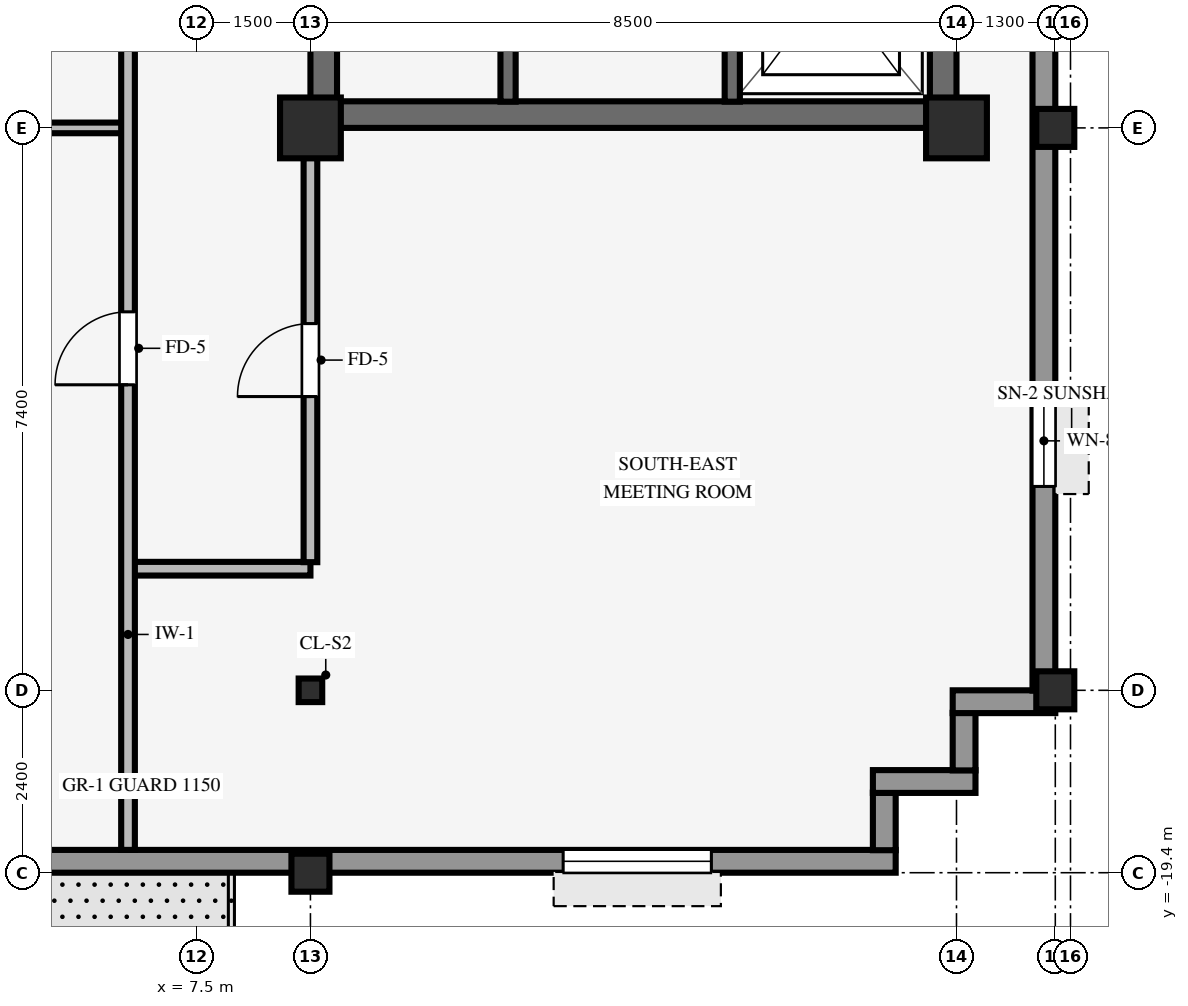
"""IFC4 building model, lengths in metres.
Left out: names, types, materials, properties, quantities, classifications, styles, units other than length and angle.
Written with IfcOpenShell. Run it as: python <this file> out.ifc"""

import sys

from ifc_helpers import new_model, si_unit, direction, frame, frame_2d, origin, origin_2d, place, context, subcontext, project, spatial, rectangle, hollow_rectangle, i_section, extrude, source, transform, mapped, element, fill, save


model = new_model("IFC4")
c1 = context("Model", 3, precision=1e-05, world=origin(), true_north=direction((0.0, 1.0)))
c2 = subcontext(c1, "Body", "Model", "MODEL_VIEW")
j1 = project(units=[si_unit("LENGTHUNIT", "METRE"), si_unit("PLANEANGLEUNIT", "RADIAN")], contexts=[c1])
p1 = place(None, origin())
s1 = spatial("IfcSite", under=j1, at=p1, CompositionType="ELEMENT")
p2 = place(p1, origin())
s2 = spatial("IfcBuilding", under=s1, at=p2, CompositionType="ELEMENT")
p3 = place(p2, frame((0.0, 0.0, 261.6)))
s3 = spatial("IfcBuildingStorey", under=s2, at=p3, CompositionType="ELEMENT", Elevation=261.6)
p4 = place(p3, frame((9.0, -9.425, 0.0), z_axis=(0.0, 0.0, 1.0), x_axis=(1.0, 0.0, 0.0)))
e1 = element("IfcWall", 1, at=p4, inside=s3, PredefinedType="SHEAR", context=c2, shape_type="SweptSolid", body=[
    extrude(rectangle(XDim=8.5, YDim=0.35, at=frame_2d((4.25, 0.0))), origin(), (0.0, 0.0, 1.0), 3.37),
])
p5 = place(p3, frame((9.175, -9.255, 0.0), z_axis=(0.0, 0.0, 1.0), x_axis=(0.0, 1.0, 0.0)))
e2 = element("IfcWall", 2, at=p5, inside=s3, PredefinedType="SHEAR", context=c2, shape_type="SweptSolid", body=[
    extrude(rectangle(XDim=18.51, YDim=0.35, at=frame_2d((9.255, 0.0))), origin(), (0.0, 0.0, 1.0), 3.37),
])
p6 = place(p5, frame((8.655, 0.0, 0.0)))
e3 = element("IfcOpeningElement", 3, at=p6, cuts=e2, PredefinedType="OPENING", context=c2, shape_type="SweptSolid", body=[
    extrude(rectangle(XDim=1.2, YDim=2.15, at=frame_2d((0.6, 1.075))), frame((0.0, 0.185, 0.0), z_axis=(0.0, -1.0, 0.0), x_axis=(1.0, 0.0, 0.0)), (0.0, 0.0, 1.0), 0.37),
])
p7 = place(p3, frame((17.325, -9.255, 0.0), z_axis=(0.0, 0.0, 1.0), x_axis=(0.0, 1.0, 0.0)))
e4 = element("IfcWall", 4, at=p7, inside=s3, PredefinedType="SHEAR", context=c2, shape_type="SweptSolid", body=[
    extrude(rectangle(XDim=18.51, YDim=0.35, at=frame_2d((9.255, 0.0))), origin(), (0.0, 0.0, 1.0), 3.37),
])
for number, where, z_axis, x_axis in (
    (5, (9.0, -9.6, 0.0), (0.0, 0.0, 1.0), (1.0, 0.0, 0.0)),
    (6, (17.5, -9.6, 0.0), (0.0, 0.0, 1.0), (1.0, 0.0, 0.0)),
):
    element("IfcColumn", number, at=place(p3, frame(where, z_axis=z_axis, x_axis=x_axis)), inside=s3, PredefinedType="COLUMN", context=c2, shape_type="SweptSolid", body=[
        extrude(rectangle(XDim=0.8, YDim=0.8, at=origin_2d()), origin(), (0.0, 0.0, 1.0), 3.37),
    ])
for number, where, z_axis, x_axis in (
    (7, (18.8, -17.0, 0.0), (0.0, 0.0, 1.0), (1.0, 0.0, 0.0)),
    (8, (18.8, -9.6, 0.0), (0.0, 0.0, 1.0), (1.0, 0.0, 0.0)),
    (9, (9.0, -19.4, 0.0), (0.0, 0.0, 1.0), (1.0, 0.0, 0.0)),
):
    element("IfcColumn", number, at=place(p3, frame(where, z_axis=z_axis, x_axis=x_axis)), inside=s3, PredefinedType="COLUMN", context=c2, shape_type="SweptSolid", body=[
        extrude(hollow_rectangle(XDim=0.5, YDim=0.5, WallThickness=0.032, InnerFilletRadius=0.032, OuterFilletRadius=0.064, at=origin_2d()), origin(), (0.0, 0.0, 1.0), 3.37),
    ])
p8 = place(p3, frame((9.0, -17.0, 0.0), z_axis=(0.0, 0.0, 1.0), x_axis=(1.0, 0.0, 0.0)))
e10 = element("IfcColumn", 10, at=p8, inside=s3, PredefinedType="COLUMN", context=c2, shape_type="SweptSolid", body=[
    extrude(i_section(OverallWidth=0.31, OverallDepth=0.31, WebThickness=0.015, FlangeThickness=0.015, FilletRadius=0.015, at=origin_2d()), origin(), (0.0, 0.0, 1.0), 3.37),
])
p9 = place(p3, frame((-18.9, -19.25, 0.0), z_axis=(0.0, 0.0, 1.0), x_axis=(1.0, 0.0, 0.0)))
e11 = element("IfcWall", 11, at=p9, inside=s3, PredefinedType="STANDARD", context=c2, shape_type="SweptSolid", body=[
    extrude(rectangle(XDim=35.6, YDim=0.3, at=frame_2d((17.8, 0.0))), origin(), (0.0, 0.0, 1.0), 2.705),
])
p10 = place(p9, frame((24.15, 0.0, 0.0), z_axis=(0.0, 0.0, 1.0), x_axis=(-1.0, 0.0, 0.0)))
e12 = element("IfcOpeningElement", 12, at=p10, cuts=e11, PredefinedType="OPENING", context=c2, shape_type="SweptSolid", body=[
    extrude(rectangle(XDim=1.05, YDim=2.1, at=frame_2d((0.525, 1.05))), frame((0.0, 0.16, 0.0), z_axis=(0.0, -1.0, 0.0), x_axis=(1.0, 0.0, 0.0)), (0.0, 0.0, 1.0), 0.32),
])
p11 = place(p9, frame((2.425, 0.0, 0.8)))
e13 = element("IfcOpeningElement", 13, at=p11, cuts=e11, PredefinedType="OPENING", context=c2, shape_type="SweptSolid", body=[
    extrude(rectangle(XDim=1.95, YDim=1.48, at=frame_2d((0.975, 0.74))), frame((0.0, 0.16, 0.0), z_axis=(0.0, -1.0, 0.0), x_axis=(1.0, 0.0, 0.0)), (0.0, 0.0, 1.0), 0.32),
])
p12 = place(p9, frame((7.225, 0.0, 0.8)))
e14 = element("IfcOpeningElement", 14, at=p12, cuts=e11, PredefinedType="OPENING", context=c2, shape_type="SweptSolid", body=[
    extrude(rectangle(XDim=1.95, YDim=1.48, at=frame_2d((0.975, 0.74))), frame((0.0, 0.16, 0.0), z_axis=(0.0, -1.0, 0.0), x_axis=(1.0, 0.0, 0.0)), (0.0, 0.0, 1.0), 0.32),
])
p13 = place(p9, frame((12.925, 0.0, 0.8)))
e15 = element("IfcOpeningElement", 15, at=p13, cuts=e11, PredefinedType="OPENING", context=c2, shape_type="SweptSolid", body=[
    extrude(rectangle(XDim=1.95, YDim=1.48, at=frame_2d((0.975, 0.74))), frame((0.0, 0.16, 0.0), z_axis=(0.0, -1.0, 0.0), x_axis=(1.0, 0.0, 0.0)), (0.0, 0.0, 1.0), 0.32),
])
p14 = place(p9, frame((15.475, 0.0, 0.8)))
e16 = element("IfcOpeningElement", 16, at=p14, cuts=e11, PredefinedType="OPENING", context=c2, shape_type="SweptSolid", body=[
    extrude(rectangle(XDim=1.95, YDim=1.48, at=frame_2d((0.975, 0.74))), frame((0.0, 0.16, 0.0), z_axis=(0.0, -1.0, 0.0), x_axis=(1.0, 0.0, 0.0)), (0.0, 0.0, 1.0), 0.32),
])
p15 = place(p9, frame((20.725, 0.0, 0.8)))
e17 = element("IfcOpeningElement", 17, at=p15, cuts=e11, PredefinedType="OPENING", context=c2, shape_type="SweptSolid", body=[
    extrude(rectangle(XDim=1.95, YDim=1.48, at=frame_2d((0.975, 0.74))), frame((0.0, 0.16, 0.0), z_axis=(0.0, -1.0, 0.0), x_axis=(1.0, 0.0, 0.0)), (0.0, 0.0, 1.0), 0.32),
])
p16 = place(p9, frame((31.225, 0.0, 0.8)))
e18 = element("IfcOpeningElement", 18, at=p16, cuts=e11, PredefinedType="OPENING", context=c2, shape_type="SweptSolid", body=[
    extrude(rectangle(XDim=1.95, YDim=1.48, at=frame_2d((0.975, 0.74))), frame((0.0, 0.16, 0.0), z_axis=(0.0, -1.0, 0.0), x_axis=(1.0, 0.0, 0.0)), (0.0, 0.0, 1.0), 0.32),
])
p17 = place(p3, frame((16.55, -19.104, 0.0), z_axis=(0.0, 0.0, 1.0), x_axis=(0.0, 1.0, 0.0)))
e19 = element("IfcWall", 19, at=p17, inside=s3, PredefinedType="STANDARD", context=c2, shape_type="SweptSolid", body=[
    extrude(rectangle(XDim=0.758, YDim=0.3, at=frame_2d((0.379, 0.0))), origin(), (0.0, 0.0, 1.0), 2.892),
])
p18 = place(p3, frame((16.4, -18.2, 0.0), z_axis=(0.0, 0.0, 1.0), x_axis=(1.0, 0.0, 0.0)))
e20 = element("IfcWall", 20, at=p18, inside=s3, PredefinedType="STANDARD", context=c2, shape_type="SweptSolid", body=[
    extrude(rectangle(XDim=1.35, YDim=0.3, at=frame_2d((0.675, 0.0))), origin(), (0.0, 0.0, 1.0), 2.892),
])
p19 = place(p3, frame((17.6, -18.054, 0.0), z_axis=(0.0, 0.0, 1.0), x_axis=(0.0, 1.0, 0.0)))
e21 = element("IfcWall", 21, at=p19, inside=s3, PredefinedType="STANDARD", context=c2, shape_type="SweptSolid", body=[
    extrude(rectangle(XDim=0.758, YDim=0.3, at=frame_2d((0.379, 0.0))), origin(), (0.0, 0.0, 1.0), 2.892),
])
p20 = place(p3, frame((17.45, -17.15, 0.0), z_axis=(0.0, 0.0, 1.0), x_axis=(1.0, 0.0, 0.0)))
e22 = element("IfcWall", 22, at=p20, inside=s3, PredefinedType="STANDARD", context=c2, shape_type="SweptSolid", body=[
    extrude(rectangle(XDim=1.35, YDim=0.3, at=frame_2d((0.675, 0.0))), origin(), (0.0, 0.0, 1.0), 2.892),
])
p21 = place(p3, frame((18.65, -17.004, 0.0), z_axis=(0.0, 0.0, 1.0), x_axis=(0.0, 1.0, 0.0)))
e23 = element("IfcWall", 23, at=p21, inside=s3, PredefinedType="STANDARD", context=c2, shape_type="SweptSolid", body=[
    extrude(rectangle(XDim=34.008, YDim=0.3, at=frame_2d((17.004, 0.0))), origin(), (0.0, 0.0, 1.0), 2.705),
])
p22 = place(p21, frame((2.686, 0.0, 0.8)))
e24 = element("IfcOpeningElement", 24, at=p22, cuts=e23, PredefinedType="OPENING", context=c2, shape_type="SweptSolid", body=[
    extrude(rectangle(XDim=1.2, YDim=1.48, at=frame_2d((0.6, 0.74))), frame((0.0, 0.16, 0.0), z_axis=(0.0, -1.0, 0.0), x_axis=(1.0, 0.0, 0.0)), (0.0, 0.0, 1.0), 0.32),
])
p23 = place(p21, frame((30.122, 0.0, 0.8)))
e25 = element("IfcOpeningElement", 25, at=p23, cuts=e23, PredefinedType="OPENING", context=c2, shape_type="SweptSolid", body=[
    extrude(rectangle(XDim=1.2, YDim=1.48, at=frame_2d((0.6, 0.74))), frame((0.0, 0.16, 0.0), z_axis=(0.0, -1.0, 0.0), x_axis=(1.0, 0.0, 0.0)), (0.0, 0.0, 1.0), 0.32),
])
p24 = place(p3, frame((14.55, -9.255, 0.0), z_axis=(0.0, 0.0, 1.0), x_axis=(0.0, 1.0, 0.0)))
e26 = element("IfcWall", 26, at=p24, inside=s3, PredefinedType="SHEAR", context=c2, shape_type="SweptSolid", body=[
    extrude(rectangle(XDim=10.16, YDim=0.2, at=frame_2d((5.08, 0.0))), origin(), (0.0, 0.0, 1.0), 3.37),
])
p25 = place(p24, frame((6.615, 0.0, 0.0)))
e27 = element("IfcOpeningElement", 27, at=p25, cuts=e26, PredefinedType="OPENING", context=c2, shape_type="SweptSolid", body=[
    extrude(rectangle(XDim=0.88, YDim=2.1, at=frame_2d((0.44, 1.05))), frame((0.0, 0.11, 0.0), z_axis=(0.0, -1.0, 0.0), x_axis=(1.0, 0.0, 0.0)), (0.0, 0.0, 1.0), 0.22),
])
p26 = place(p24, frame((0.98, 0.0, 0.0)))
e28 = element("IfcOpeningElement", 28, at=p26, cuts=e26, PredefinedType="OPENING", context=c2, shape_type="SweptSolid", body=[
    extrude(rectangle(XDim=1.15, YDim=2.15, at=frame_2d((0.575, 1.075))), frame((0.0, 0.11, 0.0), z_axis=(0.0, -1.0, 0.0), x_axis=(1.0, 0.0, 0.0)), (0.0, 0.0, 1.0), 0.22),
])
p27 = place(p3, frame((11.6, -9.255, 0.0), z_axis=(0.0, 0.0, 1.0), x_axis=(0.0, 1.0, 0.0)))
e29 = element("IfcWall", 29, at=p27, inside=s3, PredefinedType="SHEAR", context=c2, shape_type="SweptSolid", body=[
    extrude(rectangle(XDim=8.025, YDim=0.2, at=frame_2d((4.012, 0.0))), origin(), (0.0, 0.0, 1.0), 3.37),
])
p28 = place(p27, frame((5.615, 0.0, 0.0)))
e30 = element("IfcOpeningElement", 30, at=p28, cuts=e29, PredefinedType="OPENING", context=c2, shape_type="SweptSolid", body=[
    extrude(rectangle(XDim=0.88, YDim=2.1, at=frame_2d((0.44, 1.05))), frame((0.0, 0.11, 0.0), z_axis=(0.0, -1.0, 0.0), x_axis=(1.0, 0.0, 0.0)), (0.0, 0.0, 1.0), 0.22),
])
p29 = place(p3, frame((6.666, -15.4, 0.0), z_axis=(0.0, 0.0, 1.0), x_axis=(1.0, 0.0, 0.0)))
e31 = element("IfcWall", 31, at=p29, inside=s3, PredefinedType="PARTITIONING", context=c2, shape_type="SweptSolid", body=[
    extrude(rectangle(XDim=2.334, YDim=0.18, at=frame_2d((1.167, 0.0))), origin(), (0.0, 0.0, 1.0), 3.36),
])
p30 = place(p3, frame((0.151, -9.6, 0.0), z_axis=(0.0, 0.0, 1.0), x_axis=(1.0, 0.0, 0.0)))
e32 = element("IfcWall", 32, at=p30, inside=s3, PredefinedType="PARTITIONING", context=c2, shape_type="SweptSolid", body=[
    extrude(rectangle(XDim=6.383, YDim=0.14, at=frame_2d((3.191, 0.0))), origin(), (0.0, 0.0, 1.0), 2.405),
])
p31 = place(p3, frame((6.6, -19.1, 0.0), z_axis=(0.0, 0.0, 1.0), x_axis=(0.0, 1.0, 0.0)))
e33 = element("IfcWall", 33, at=p31, inside=s3, PredefinedType="PARTITIONING", context=c2, shape_type="SweptSolid", body=[
    extrude(rectangle(XDim=17.764, YDim=0.18, at=frame_2d((8.882, 0.0))), origin(), (0.0, 0.0, 1.0), 3.36),
])
p32 = place(p31, frame((13.152, 0.0, 0.0)))
e34 = element("IfcOpeningElement", 34, at=p32, cuts=e33, PredefinedType="OPENING", context=c2, shape_type="SweptSolid", body=[
    extrude(rectangle(XDim=0.96, YDim=2.1, at=frame_2d((0.48, 1.05))), frame((0.0, 0.1, 0.0), z_axis=(0.0, -1.0, 0.0), x_axis=(1.0, 0.0, 0.0)), (0.0, 0.0, 1.0), 0.2),
])
p33 = place(p31, frame((6.12, 0.0, 0.0)))
e35 = element("IfcOpeningElement", 35, at=p33, cuts=e33, PredefinedType="OPENING", context=c2, shape_type="SweptSolid", body=[
    extrude(rectangle(XDim=0.96, YDim=2.1, at=frame_2d((0.48, 1.05))), frame((0.0, 0.1, 0.0), z_axis=(0.0, -1.0, 0.0), x_axis=(1.0, 0.0, 0.0)), (0.0, 0.0, 1.0), 0.2),
])
p34 = place(p3, frame((9.0, -15.314, 0.0), z_axis=(0.0, 0.0, 1.0), x_axis=(0.0, 1.0, 0.0)))
e36 = element("IfcWall", 36, at=p34, inside=s3, PredefinedType="PARTITIONING", context=c2, shape_type="SweptSolid", body=[
    extrude(rectangle(XDim=5.318, YDim=0.18, at=frame_2d((2.659, 0.0))), origin(), (0.0, 0.0, 1.0), 2.892),
])
p35 = place(p34, frame((2.179, 0.0, 0.0)))
e37 = element("IfcOpeningElement", 37, at=p35, cuts=e36, PredefinedType="OPENING", context=c2, shape_type="SweptSolid", body=[
    extrude(rectangle(XDim=0.96, YDim=2.1, at=frame_2d((0.48, 1.05))), frame((0.0, 0.1, 0.0), z_axis=(0.0, -1.0, 0.0), x_axis=(1.0, 0.0, 0.0)), (0.0, 0.0, 1.0), 0.2),
])
m1 = source(origin(), c2, "Body", "SweptSolid", [
    extrude(rectangle(XDim=1.95, YDim=1.48, at=frame_2d((0.975, 0.74))), frame((0.0, 0.03, 0.0), z_axis=(0.0, -1.0, 0.0), x_axis=(1.0, 0.0, 0.0)), (0.0, 0.0, 1.0), 0.06),
])
p36 = place(p16, origin())
e38 = element("IfcWindow", 38, at=p36, inside=s3, PartitioningType="SINGLE_PANEL", PredefinedType="WINDOW", context=c2, shape_type="MappedRepresentation", body=[
    mapped(m1, transform((0.0, 0.0, 0.0), scale=1.0)),
])
fill(e18, e38)
m2 = source(origin(), c2, "Body", "SweptSolid", [
    extrude(rectangle(XDim=1.2, YDim=1.48, at=frame_2d((0.6, 0.74))), frame((0.0, 0.03, 0.0), z_axis=(0.0, -1.0, 0.0), x_axis=(1.0, 0.0, 0.0)), (0.0, 0.0, 1.0), 0.06),
])
p37 = place(p22, origin())
e39 = element("IfcWindow", 39, at=p37, inside=s3, PartitioningType="SINGLE_PANEL", PredefinedType="WINDOW", context=c2, shape_type="MappedRepresentation", body=[
    mapped(m2, transform((0.0, 0.0, 0.0), scale=1.0)),
])
fill(e24, e39)
m3 = source(origin(), c2, "Body", "SweptSolid", [
    extrude(rectangle(XDim=0.96, YDim=2.1, at=frame_2d((0.48, 1.05))), frame((0.0, 0.025, 0.0), z_axis=(0.0, -1.0, 0.0), x_axis=(1.0, 0.0, 0.0)), (0.0, 0.0, 1.0), 0.05),
])
p38 = place(p33, origin())
e40 = element("IfcDoor", 40, at=p38, inside=s3, OperationType="SINGLE_SWING_LEFT", PredefinedType="DOOR", context=c2, shape_type="MappedRepresentation", body=[
    mapped(m3, transform((0.0, 0.0, 0.0), scale=1.0)),
])
fill(e35, e40)
p39 = place(p35, origin())
e41 = element("IfcDoor", 41, at=p39, inside=s3, OperationType="SINGLE_SWING_LEFT", PredefinedType="DOOR", context=c2, shape_type="MappedRepresentation", body=[
    mapped(m3, transform((0.0, 0.0, 0.0), scale=1.0)),
])
fill(e37, e41)
save(model, sys.argv[1])
